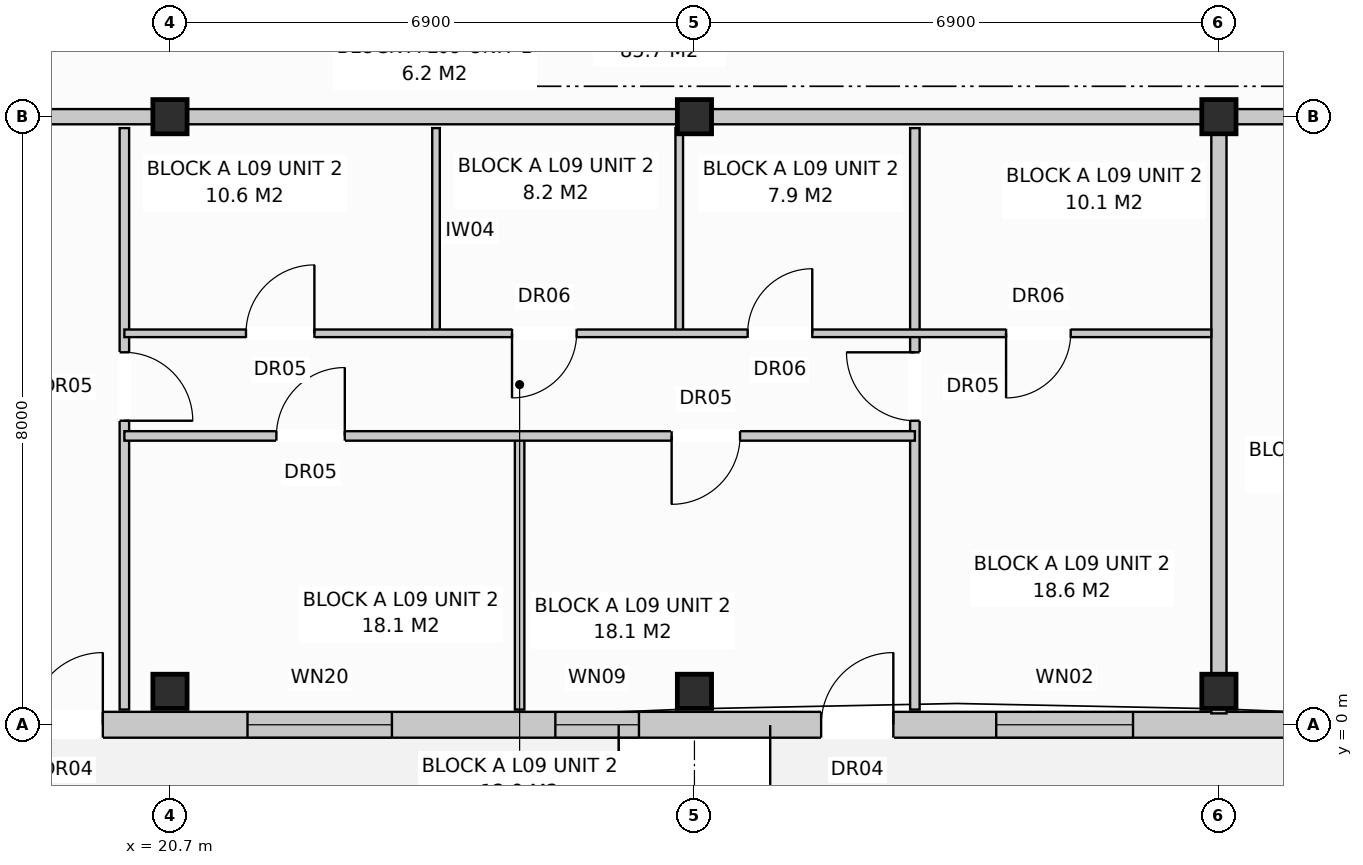
"""IFC4 building model, lengths in metres.
Left out: names, types, materials, properties, quantities, classifications, styles, units other than length and angle.
Written with IfcOpenShell. Run it as: python <this file> out.ifc"""

import sys

from ifc_helpers import new_model, si_unit, direction, frame, frame_2d, origin, origin_with_axes, origin_2d, place, context, subcontext, project, spatial, rectangle, extrude, element, fill, save


model = new_model("IFC4")
c1 = context("Model", 3, precision=1e-05, world=origin(), true_north=direction((0.0, 1.0)))
c2 = subcontext(c1, "Body", "Model", "MODEL_VIEW")
j1 = project(units=[si_unit("LENGTHUNIT", "METRE"), si_unit("PLANEANGLEUNIT", "RADIAN")], contexts=[c1])
p1 = place(None, origin())
s1 = spatial("IfcSite", under=j1, at=p1, CompositionType="ELEMENT")
p2 = place(p1, origin())
s2 = spatial("IfcBuilding", under=s1, at=p2, CompositionType="ELEMENT")
p3 = place(p2, frame((0.0, 0.0, 30.4)))
s3 = spatial("IfcBuildingStorey", under=s2, at=p3, CompositionType="ELEMENT", Elevation=30.4)
for number, where, z_axis, x_axis in (
    (1, (20.7, 0.44, 0.0), (0.0, 0.0, 1.0), (1.0, 0.0, 0.0)),
    (2, (20.7, 8.0, 0.0), (0.0, 0.0, 1.0), (1.0, 0.0, 0.0)),
    (3, (27.6, 0.44, 0.0), (0.0, 0.0, 1.0), (1.0, 0.0, 0.0)),
    (4, (27.6, 8.0, 0.0), (0.0, 0.0, 1.0), (1.0, 0.0, 0.0)),
    (5, (34.5, 0.44, 0.0), (0.0, 0.0, 1.0), (1.0, 0.0, 0.0)),
    (6, (34.5, 8.0, 0.0), (0.0, 0.0, 1.0), (1.0, 0.0, 0.0)),
):
    element("IfcColumn", number, at=place(p3, frame(where, z_axis=z_axis, x_axis=x_axis)), inside=s3, PredefinedType="COLUMN", context=c2, shape_type="SweptSolid", body=[
        extrude(rectangle(XDim=0.45, YDim=0.45, at=origin_2d()), origin(), (0.0, 0.0, 1.0), 3.2),
    ])
p4 = place(p3, frame((0.16, 0.0, 0.0), z_axis=(0.0, 0.0, 1.0), x_axis=(1.0, 0.0, 0.0)))
e7 = element("IfcWall", 7, at=p4, inside=s3, PredefinedType="STANDARD", context=c2, shape_type="SweptSolid", body=[
    extrude(rectangle(XDim=41.08, YDim=0.34, at=frame_2d((20.54, 0.0))), origin(), (0.0, 0.0, 1.0), 2.96),
])
p5 = place(p4, frame((3.807, 0.0, 0.0)))
e8 = element("IfcOpeningElement", 8, at=p5, cuts=e7, PredefinedType="OPENING", context=c2, shape_type="SweptSolid", body=[
    extrude(rectangle(XDim=0.95, YDim=2.1, at=frame_2d((0.475, 1.05))), frame((0.0, 0.182, 0.0), z_axis=(0.0, -1.0, 0.0), x_axis=(1.0, 0.0, 0.0)), (0.0, 0.0, 1.0), 0.364),
])
p6 = place(p4, frame((18.707, 0.0, 0.0)))
e9 = element("IfcOpeningElement", 9, at=p6, cuts=e7, PredefinedType="OPENING", context=c2, shape_type="SweptSolid", body=[
    extrude(rectangle(XDim=0.95, YDim=2.1, at=frame_2d((0.475, 1.05))), frame((0.0, 0.182, 0.0), z_axis=(0.0, -1.0, 0.0), x_axis=(1.0, 0.0, 0.0)), (0.0, 0.0, 1.0), 0.364),
])
p7 = place(p4, frame((29.107, 0.0, 0.0)))
e10 = element("IfcOpeningElement", 10, at=p7, cuts=e7, PredefinedType="OPENING", context=c2, shape_type="SweptSolid", body=[
    extrude(rectangle(XDim=0.95, YDim=2.1, at=frame_2d((0.475, 1.05))), frame((0.0, 0.182, 0.0), z_axis=(0.0, -1.0, 0.0), x_axis=(1.0, 0.0, 0.0)), (0.0, 0.0, 1.0), 0.364),
])
p8 = place(p4, frame((1.61, 0.0, 0.8)))
e11 = element("IfcOpeningElement", 11, at=p8, cuts=e7, PredefinedType="OPENING", context=c2, shape_type="SweptSolid", body=[
    extrude(rectangle(XDim=1.8, YDim=1.7, at=frame_2d((0.9, 0.85))), frame((0.0, 0.182, 0.0), z_axis=(0.0, -1.0, 0.0), x_axis=(1.0, 0.0, 0.0)), (0.0, 0.0, 1.0), 0.364),
])
p9 = place(p4, frame((7.242, 0.0, 0.72)))
e12 = element("IfcOpeningElement", 12, at=p9, cuts=e7, PredefinedType="OPENING", context=c2, shape_type="SweptSolid", body=[
    extrude(rectangle(XDim=1.9, YDim=1.85, at=frame_2d((0.95, 0.925))), frame((0.0, 0.182, 0.0), z_axis=(0.0, -1.0, 0.0), x_axis=(1.0, 0.0, 0.0)), (0.0, 0.0, 1.0), 0.364),
])
p10 = place(p4, frame((10.86, 0.0, 0.72)))
e13 = element("IfcOpeningElement", 13, at=p10, cuts=e7, PredefinedType="OPENING", context=c2, shape_type="SweptSolid", body=[
    extrude(rectangle(XDim=1.1, YDim=1.5, at=frame_2d((0.55, 0.75))), frame((0.0, 0.182, 0.0), z_axis=(0.0, -1.0, 0.0), x_axis=(1.0, 0.0, 0.0)), (0.0, 0.0, 1.0), 0.364),
])
p11 = place(p4, frame((15.91, 0.0, 0.8)))
e14 = element("IfcOpeningElement", 14, at=p11, cuts=e7, PredefinedType="OPENING", context=c2, shape_type="SweptSolid", body=[
    extrude(rectangle(XDim=1.8, YDim=1.7, at=frame_2d((0.9, 0.85))), frame((0.0, 0.182, 0.0), z_axis=(0.0, -1.0, 0.0), x_axis=(1.0, 0.0, 0.0)), (0.0, 0.0, 1.0), 0.364),
])
p12 = place(p4, frame((21.56, 0.0, 0.72)))
e15 = element("IfcOpeningElement", 15, at=p12, cuts=e7, PredefinedType="OPENING", context=c2, shape_type="SweptSolid", body=[
    extrude(rectangle(XDim=1.9, YDim=1.85, at=frame_2d((0.95, 0.925))), frame((0.0, 0.182, 0.0), z_axis=(0.0, -1.0, 0.0), x_axis=(1.0, 0.0, 0.0)), (0.0, 0.0, 1.0), 0.364),
])
p13 = place(p4, frame((25.61, 0.0, 0.72)))
e16 = element("IfcOpeningElement", 16, at=p13, cuts=e7, PredefinedType="OPENING", context=c2, shape_type="SweptSolid", body=[
    extrude(rectangle(XDim=1.1, YDim=1.5, at=frame_2d((0.55, 0.75))), frame((0.0, 0.182, 0.0), z_axis=(0.0, -1.0, 0.0), x_axis=(1.0, 0.0, 0.0)), (0.0, 0.0, 1.0), 0.364),
])
p14 = place(p4, frame((31.41, 0.0, 0.8)))
e17 = element("IfcOpeningElement", 17, at=p14, cuts=e7, PredefinedType="OPENING", context=c2, shape_type="SweptSolid", body=[
    extrude(rectangle(XDim=1.8, YDim=1.7, at=frame_2d((0.9, 0.85))), frame((0.0, 0.182, 0.0), z_axis=(0.0, -1.0, 0.0), x_axis=(1.0, 0.0, 0.0)), (0.0, 0.0, 1.0), 0.364),
])
p15 = place(p4, frame((35.36, 0.0, 0.72)))
e18 = element("IfcOpeningElement", 18, at=p15, cuts=e7, PredefinedType="OPENING", context=c2, shape_type="SweptSolid", body=[
    extrude(rectangle(XDim=1.9, YDim=1.85, at=frame_2d((0.95, 0.925))), frame((0.0, 0.182, 0.0), z_axis=(0.0, -1.0, 0.0), x_axis=(1.0, 0.0, 0.0)), (0.0, 0.0, 1.0), 0.364),
])
p16 = place(p4, frame((39.16, 0.0, 0.72)))
e19 = element("IfcOpeningElement", 19, at=p16, cuts=e7, PredefinedType="OPENING", context=c2, shape_type="SweptSolid", body=[
    extrude(rectangle(XDim=1.1, YDim=1.5, at=frame_2d((0.55, 0.75))), frame((0.0, 0.182, 0.0), z_axis=(0.0, -1.0, 0.0), x_axis=(1.0, 0.0, 0.0)), (0.0, 0.0, 1.0), 0.364),
])
p17 = place(p3, frame((34.5, 7.85, 0.0), z_axis=(0.0, 0.0, 1.0), x_axis=(0.0, -1.0, 0.0)))
e20 = element("IfcWall", 20, at=p17, inside=s3, PredefinedType="PARTITIONING", context=c2, shape_type="SweptSolid", body=[
    extrude(rectangle(XDim=7.7, YDim=0.2, at=frame_2d((3.85, 0.0))), origin(), (0.0, 0.0, 1.0), 2.4),
])
p18 = place(p3, frame((13.8, 8.0, 0.0), z_axis=(0.0, 0.0, 1.0), x_axis=(1.0, 0.0, 0.0)))
e21 = element("IfcWall", 21, at=p18, inside=s3, PredefinedType="PARTITIONING", context=c2, shape_type="SweptSolid", body=[
    extrude(rectangle(XDim=20.7, YDim=0.2, at=frame_2d((10.35, 0.0))), origin(), (0.0, 0.0, 1.0), 2.4),
])
p19 = place(p18, frame((2.4, 0.0, 0.0)))
e22 = element("IfcOpeningElement", 22, at=p19, cuts=e21, PredefinedType="OPENING", context=c2, shape_type="SweptSolid", body=[
    extrude(rectangle(XDim=0.95, YDim=2.15, at=frame_2d((0.475, 1.075))), frame((0.0, 0.112, 0.0), z_axis=(0.0, -1.0, 0.0), x_axis=(1.0, 0.0, 0.0)), (0.0, 0.0, 1.0), 0.224),
])
p20 = place(p3, frame((20.1, 7.85, 0.0), z_axis=(0.0, 0.0, 1.0), x_axis=(0.0, -1.0, 0.0)))
e23 = element("IfcWall", 23, at=p20, inside=s3, PredefinedType="PARTITIONING", context=c2, shape_type="SweptSolid", body=[
    extrude(rectangle(XDim=7.65, YDim=0.125, at=frame_2d((3.825, 0.0))), origin(), (0.0, 0.0, 1.0), 2.96),
])
p21 = place(p20, frame((2.95, 0.0, 0.0)))
e24 = element("IfcOpeningElement", 24, at=p21, cuts=e23, PredefinedType="OPENING", context=c2, shape_type="SweptSolid", body=[
    extrude(rectangle(XDim=0.9, YDim=2.1, at=frame_2d((0.45, 1.05))), frame((0.0, 0.074, 0.0), z_axis=(0.0, -1.0, 0.0), x_axis=(1.0, 0.0, 0.0)), (0.0, 0.0, 1.0), 0.149),
])
for number, where, z_axis, x_axis in (
    (25, (24.2, 7.85, 0.0), (0.0, 0.0, 1.0), (0.0, -1.0, 0.0)),
    (26, (27.4, 7.85, 0.0), (0.0, 0.0, 1.0), (0.0, -1.0, 0.0)),
):
    element("IfcWall", number, at=place(p3, frame(where, z_axis=z_axis, x_axis=x_axis)), inside=s3, PredefinedType="PARTITIONING", context=c2, shape_type="SweptSolid", body=[
        extrude(rectangle(XDim=2.7, YDim=0.1, at=frame_2d((1.35, 0.0))), origin(), (0.0, 0.0, 1.0), 2.96),
    ])
p22 = place(p3, frame((25.3, 3.8, 0.0), z_axis=(0.0, 0.0, 1.0), x_axis=(0.0, -1.0, 0.0)))
e27 = element("IfcWall", 27, at=p22, inside=s3, PredefinedType="PARTITIONING", context=c2, shape_type="SweptSolid", body=[
    extrude(rectangle(XDim=3.6, YDim=0.125, at=frame_2d((1.8, 0.0))), origin(), (0.0, 0.0, 1.0), 2.96),
])
p23 = place(p3, frame((30.5, 7.85, 0.0), z_axis=(0.0, 0.0, 1.0), x_axis=(0.0, -1.0, 0.0)))
e28 = element("IfcWall", 28, at=p23, inside=s3, PredefinedType="PARTITIONING", context=c2, shape_type="SweptSolid", body=[
    extrude(rectangle(XDim=7.65, YDim=0.125, at=frame_2d((3.825, 0.0))), origin(), (0.0, 0.0, 1.0), 2.96),
])
p24 = place(p23, frame((2.95, 0.0, 0.0)))
e29 = element("IfcOpeningElement", 29, at=p24, cuts=e28, PredefinedType="OPENING", context=c2, shape_type="SweptSolid", body=[
    extrude(rectangle(XDim=0.9, YDim=2.1, at=frame_2d((0.45, 1.05))), frame((0.0, 0.074, 0.0), z_axis=(0.0, -1.0, 0.0), x_axis=(1.0, 0.0, 0.0)), (0.0, 0.0, 1.0), 0.149),
])
p25 = place(p3, frame((20.1, 5.15, 0.0), z_axis=(0.0, 0.0, 1.0), x_axis=(1.0, 0.0, 0.0)))
e30 = element("IfcWall", 30, at=p25, inside=s3, PredefinedType="PARTITIONING", context=c2, shape_type="SweptSolid", body=[
    extrude(rectangle(XDim=14.3, YDim=0.1, at=frame_2d((7.15, 0.0))), origin(), (0.0, 0.0, 1.0), 2.96),
])
p26 = place(p25, frame((1.6, 0.0, 0.0)))
e31 = element("IfcOpeningElement", 31, at=p26, cuts=e30, PredefinedType="OPENING", context=c2, shape_type="SweptSolid", body=[
    extrude(rectangle(XDim=0.9, YDim=2.1, at=frame_2d((0.45, 1.05))), frame((0.0, 0.062, 0.0), z_axis=(0.0, -1.0, 0.0), x_axis=(1.0, 0.0, 0.0)), (0.0, 0.0, 1.0), 0.124),
])
p27 = place(p25, frame((5.1, 0.0, 0.0)))
e32 = element("IfcOpeningElement", 32, at=p27, cuts=e30, PredefinedType="OPENING", context=c2, shape_type="SweptSolid", body=[
    extrude(rectangle(XDim=0.85, YDim=2.05, at=frame_2d((0.425, 1.025))), frame((0.0, 0.062, 0.0), z_axis=(0.0, -1.0, 0.0), x_axis=(1.0, 0.0, 0.0)), (0.0, 0.0, 1.0), 0.124),
])
p28 = place(p25, frame((8.2, 0.0, 0.0)))
e33 = element("IfcOpeningElement", 33, at=p28, cuts=e30, PredefinedType="OPENING", context=c2, shape_type="SweptSolid", body=[
    extrude(rectangle(XDim=0.85, YDim=2.05, at=frame_2d((0.425, 1.025))), frame((0.0, 0.062, 0.0), z_axis=(0.0, -1.0, 0.0), x_axis=(1.0, 0.0, 0.0)), (0.0, 0.0, 1.0), 0.124),
])
p29 = place(p25, frame((11.6, 0.0, 0.0)))
e34 = element("IfcOpeningElement", 34, at=p29, cuts=e30, PredefinedType="OPENING", context=c2, shape_type="SweptSolid", body=[
    extrude(rectangle(XDim=0.85, YDim=2.05, at=frame_2d((0.425, 1.025))), frame((0.0, 0.062, 0.0), z_axis=(0.0, -1.0, 0.0), x_axis=(1.0, 0.0, 0.0)), (0.0, 0.0, 1.0), 0.124),
])
p30 = place(p3, frame((20.1, 3.8, 0.0), z_axis=(0.0, 0.0, 1.0), x_axis=(1.0, 0.0, 0.0)))
e35 = element("IfcWall", 35, at=p30, inside=s3, PredefinedType="PARTITIONING", context=c2, shape_type="SweptSolid", body=[
    extrude(rectangle(XDim=10.4, YDim=0.125, at=frame_2d((5.2, 0.0))), origin(), (0.0, 0.0, 1.0), 2.96),
])
p31 = place(p30, frame((2.0, 0.0, 0.0)))
e36 = element("IfcOpeningElement", 36, at=p31, cuts=e35, PredefinedType="OPENING", context=c2, shape_type="SweptSolid", body=[
    extrude(rectangle(XDim=0.9, YDim=2.1, at=frame_2d((0.45, 1.05))), frame((0.0, 0.074, 0.0), z_axis=(0.0, -1.0, 0.0), x_axis=(1.0, 0.0, 0.0)), (0.0, 0.0, 1.0), 0.149),
])
p32 = place(p30, frame((7.2, 0.0, 0.0)))
e37 = element("IfcOpeningElement", 37, at=p32, cuts=e35, PredefinedType="OPENING", context=c2, shape_type="SweptSolid", body=[
    extrude(rectangle(XDim=0.9, YDim=2.1, at=frame_2d((0.45, 1.05))), frame((0.0, 0.074, 0.0), z_axis=(0.0, -1.0, 0.0), x_axis=(1.0, 0.0, 0.0)), (0.0, 0.0, 1.0), 0.149),
])
p33 = place(p3, frame((34.5, 8.0, 0.0), z_axis=(0.0, 0.0, 1.0), x_axis=(1.0, 0.0, 0.0)))
e38 = element("IfcWall", 38, at=p33, inside=s3, PredefinedType="PARTITIONING", context=c2, shape_type="SweptSolid", body=[
    extrude(rectangle(XDim=6.9, YDim=0.2, at=frame_2d((3.45, 0.0))), origin(), (0.0, 0.0, 1.0), 2.4),
])
p34 = place(p33, frame((2.0, 0.0, 0.0)))
e39 = element("IfcOpeningElement", 39, at=p34, cuts=e38, PredefinedType="OPENING", context=c2, shape_type="SweptSolid", body=[
    extrude(rectangle(XDim=0.95, YDim=2.15, at=frame_2d((0.475, 1.075))), frame((0.0, 0.112, 0.0), z_axis=(0.0, -1.0, 0.0), x_axis=(1.0, 0.0, 0.0)), (0.0, 0.0, 1.0), 0.224),
])
p35 = place(p6, origin_with_axes())
e40 = element("IfcDoor", 40, at=p35, inside=s3, OperationType="SINGLE_SWING_RIGHT", PredefinedType="DOOR", context=c2, shape_type="SweptSolid", body=[
    extrude(rectangle(XDim=0.95, YDim=2.1, at=frame_2d((0.475, 1.05))), frame((0.0, 0.025, 0.0), z_axis=(0.0, -1.0, 0.0), x_axis=(1.0, 0.0, 0.0)), (0.0, 0.0, 1.0), 0.05),
])
fill(e9, e40)
p36 = place(p7, origin_with_axes())
e41 = element("IfcDoor", 41, at=p36, inside=s3, OperationType="SINGLE_SWING_RIGHT", PredefinedType="DOOR", context=c2, shape_type="SweptSolid", body=[
    extrude(rectangle(XDim=0.95, YDim=2.1, at=frame_2d((0.475, 1.05))), frame((0.0, 0.025, 0.0), z_axis=(0.0, -1.0, 0.0), x_axis=(1.0, 0.0, 0.0)), (0.0, 0.0, 1.0), 0.05),
])
fill(e10, e41)
p37 = place(p12, origin_with_axes())
e42 = element("IfcWindow", 42, at=p37, inside=s3, PartitioningType="SINGLE_PANEL", PredefinedType="WINDOW", context=c2, shape_type="SweptSolid", body=[
    extrude(rectangle(XDim=1.9, YDim=1.85, at=frame_2d((0.95, 0.925))), frame((0.0, 0.03, 0.0), z_axis=(0.0, -1.0, 0.0), x_axis=(1.0, 0.0, 0.0)), (0.0, 0.0, 1.0), 0.06),
])
fill(e15, e42)
p38 = place(p13, origin_with_axes())
e43 = element("IfcWindow", 43, at=p38, inside=s3, PartitioningType="SINGLE_PANEL", PredefinedType="WINDOW", context=c2, shape_type="SweptSolid", body=[
    extrude(rectangle(XDim=1.1, YDim=1.5, at=frame_2d((0.55, 0.75))), frame((0.0, 0.03, 0.0), z_axis=(0.0, -1.0, 0.0), x_axis=(1.0, 0.0, 0.0)), (0.0, 0.0, 1.0), 0.06),
])
fill(e16, e43)
p39 = place(p14, origin_with_axes())
e44 = element("IfcWindow", 44, at=p39, inside=s3, PartitioningType="SINGLE_PANEL", PredefinedType="WINDOW", context=c2, shape_type="SweptSolid", body=[
    extrude(rectangle(XDim=1.8, YDim=1.7, at=frame_2d((0.9, 0.85))), frame((0.0, 0.03, 0.0), z_axis=(0.0, -1.0, 0.0), x_axis=(1.0, 0.0, 0.0)), (0.0, 0.0, 1.0), 0.06),
])
fill(e17, e44)
p40 = place(p21, origin_with_axes())
e45 = element("IfcDoor", 45, at=p40, inside=s3, OperationType="SINGLE_SWING_RIGHT", PredefinedType="DOOR", context=c2, shape_type="SweptSolid", body=[
    extrude(rectangle(XDim=0.9, YDim=2.1, at=frame_2d((0.45, 1.05))), frame((0.0, 0.025, 0.0), z_axis=(0.0, -1.0, 0.0), x_axis=(1.0, 0.0, 0.0)), (0.0, 0.0, 1.0), 0.05),
])
fill(e24, e45)
p41 = place(p24, frame((0.9, 0.0, 0.0), z_axis=(0.0, 0.0, 1.0), x_axis=(-1.0, 0.0, 0.0)))
e46 = element("IfcDoor", 46, at=p41, inside=s3, OperationType="SINGLE_SWING_LEFT", PredefinedType="DOOR", context=c2, shape_type="SweptSolid", body=[
    extrude(rectangle(XDim=0.9, YDim=2.1, at=frame_2d((0.45, 1.05))), frame((0.0, 0.025, 0.0), z_axis=(0.0, -1.0, 0.0), x_axis=(1.0, 0.0, 0.0)), (0.0, 0.0, 1.0), 0.05),
])
fill(e29, e46)
p42 = place(p26, origin_with_axes())
e47 = element("IfcDoor", 47, at=p42, inside=s3, OperationType="SINGLE_SWING_RIGHT", PredefinedType="DOOR", context=c2, shape_type="SweptSolid", body=[
    extrude(rectangle(XDim=0.9, YDim=2.1, at=frame_2d((0.45, 1.05))), frame((0.0, 0.025, 0.0), z_axis=(0.0, -1.0, 0.0), x_axis=(1.0, 0.0, 0.0)), (0.0, 0.0, 1.0), 0.05),
])
fill(e31, e47)
p43 = place(p27, frame((0.85, 0.0, 0.0), z_axis=(0.0, 0.0, 1.0), x_axis=(-1.0, 0.0, 0.0)))
e48 = element("IfcDoor", 48, at=p43, inside=s3, OperationType="SINGLE_SWING_LEFT", PredefinedType="DOOR", context=c2, shape_type="SweptSolid", body=[
    extrude(rectangle(XDim=0.85, YDim=2.05, at=frame_2d((0.425, 1.025))), frame((0.0, 0.025, 0.0), z_axis=(0.0, -1.0, 0.0), x_axis=(1.0, 0.0, 0.0)), (0.0, 0.0, 1.0), 0.05),
])
fill(e32, e48)
p44 = place(p28, origin_with_axes())
e49 = element("IfcDoor", 49, at=p44, inside=s3, OperationType="SINGLE_SWING_RIGHT", PredefinedType="DOOR", context=c2, shape_type="SweptSolid", body=[
    extrude(rectangle(XDim=0.85, YDim=2.05, at=frame_2d((0.425, 1.025))), frame((0.0, 0.025, 0.0), z_axis=(0.0, -1.0, 0.0), x_axis=(1.0, 0.0, 0.0)), (0.0, 0.0, 1.0), 0.05),
])
fill(e33, e49)
p45 = place(p29, frame((0.85, 0.0, 0.0), z_axis=(0.0, 0.0, 1.0), x_axis=(-1.0, 0.0, 0.0)))
e50 = element("IfcDoor", 50, at=p45, inside=s3, OperationType="SINGLE_SWING_LEFT", PredefinedType="DOOR", context=c2, shape_type="SweptSolid", body=[
    extrude(rectangle(XDim=0.85, YDim=2.05, at=frame_2d((0.425, 1.025))), frame((0.0, 0.025, 0.0), z_axis=(0.0, -1.0, 0.0), x_axis=(1.0, 0.0, 0.0)), (0.0, 0.0, 1.0), 0.05),
])
fill(e34, e50)
p46 = place(p31, origin_with_axes())
e51 = element("IfcDoor", 51, at=p46, inside=s3, OperationType="SINGLE_SWING_RIGHT", PredefinedType="DOOR", context=c2, shape_type="SweptSolid", body=[
    extrude(rectangle(XDim=0.9, YDim=2.1, at=frame_2d((0.45, 1.05))), frame((0.0, 0.025, 0.0), z_axis=(0.0, -1.0, 0.0), x_axis=(1.0, 0.0, 0.0)), (0.0, 0.0, 1.0), 0.05),
])
fill(e36, e51)
p47 = place(p32, frame((0.9, 0.0, 0.0), z_axis=(0.0, 0.0, 1.0), x_axis=(-1.0, 0.0, 0.0)))
e52 = element("IfcDoor", 52, at=p47, inside=s3, OperationType="SINGLE_SWING_LEFT", PredefinedType="DOOR", context=c2, shape_type="SweptSolid", body=[
    extrude(rectangle(XDim=0.9, YDim=2.1, at=frame_2d((0.45, 1.05))), frame((0.0, 0.025, 0.0), z_axis=(0.0, -1.0, 0.0), x_axis=(1.0, 0.0, 0.0)), (0.0, 0.0, 1.0), 0.05),
])
fill(e37, e52)
save(model, sys.argv[1])
